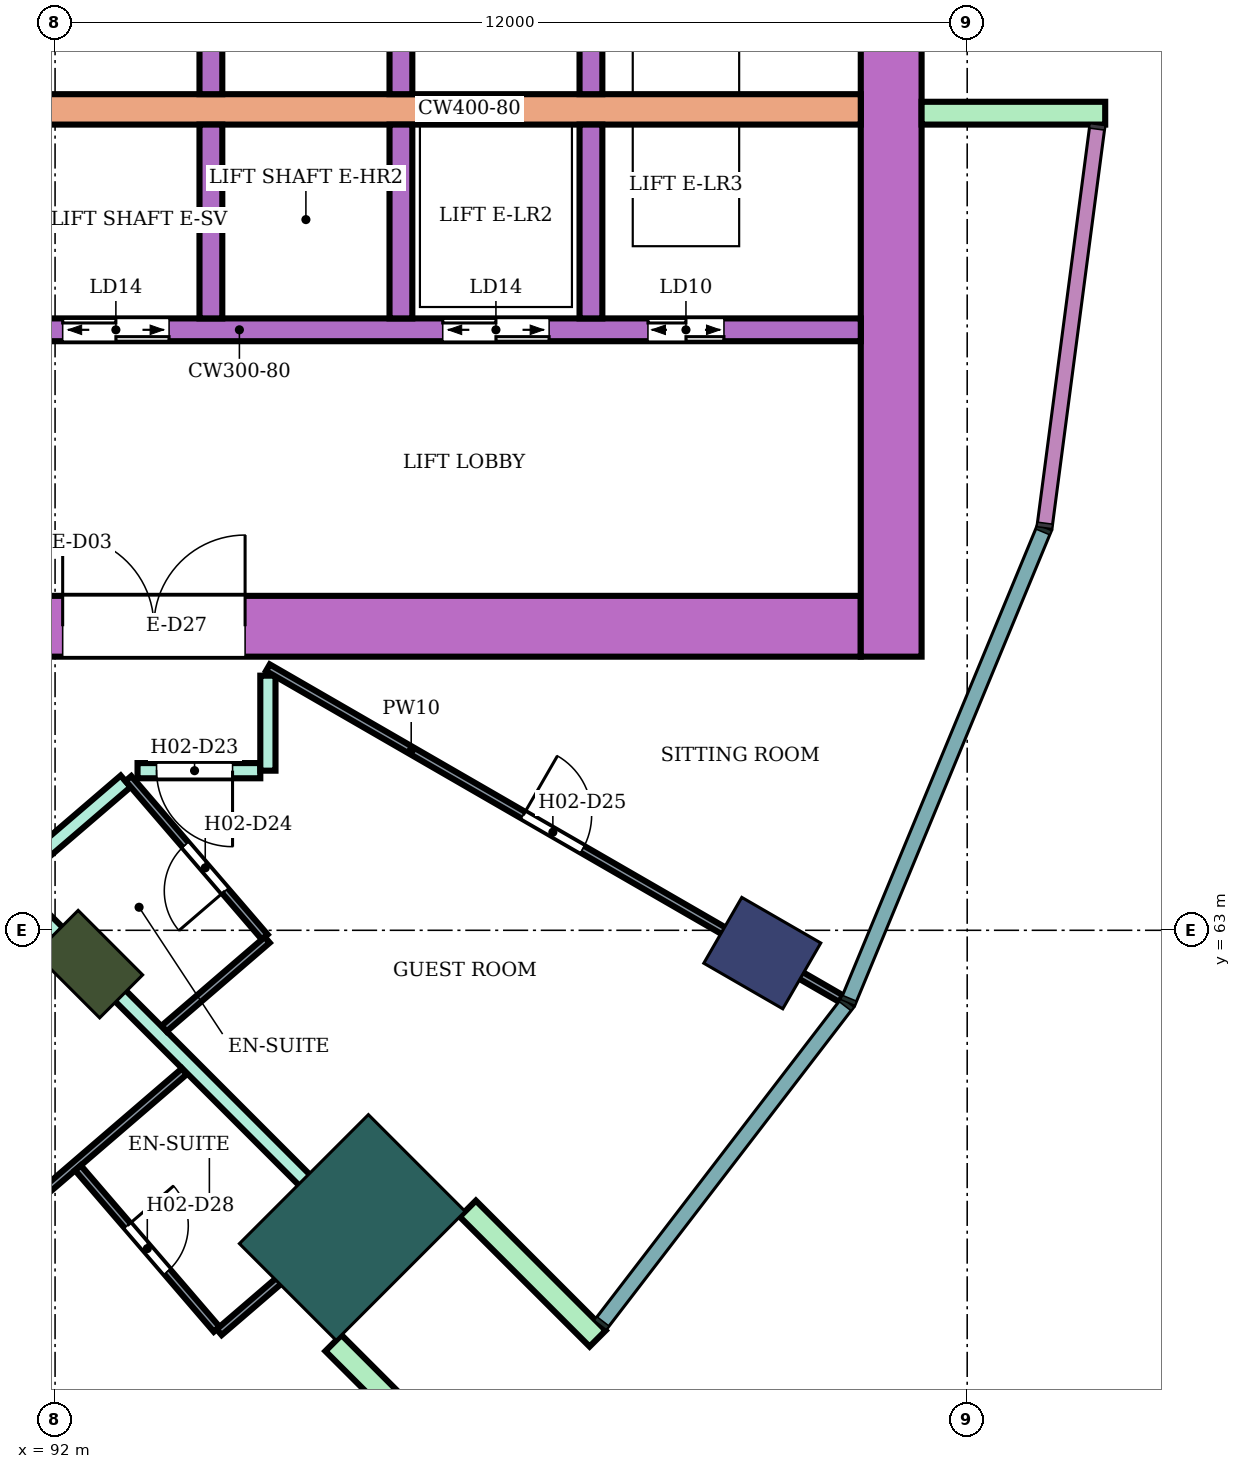
"""IFC4 building model, lengths in metres.
Left out: names, types, materials, properties, quantities, classifications, styles, units other than length and angle.
Written with IfcOpenShell. Run it as: python <this file> out.ifc"""

import sys

from ifc_helpers import new_model, si_unit, direction, frame, frame_2d, origin, origin_2d, place, context, subcontext, project, spatial, rectangle, extrude, element, fill, save


model = new_model("IFC4")
c1 = context("Model", 3, precision=1e-05, world=origin(), true_north=direction((0.0, 1.0)))
c2 = subcontext(c1, "Body", "Model", "MODEL_VIEW")
j1 = project(units=[si_unit("LENGTHUNIT", "METRE"), si_unit("PLANEANGLEUNIT", "RADIAN")], contexts=[c1])
p1 = place(None, origin())
s1 = spatial("IfcSite", under=j1, at=p1, CompositionType="ELEMENT")
p2 = place(p1, origin())
s2 = spatial("IfcBuilding", under=s1, at=p2, CompositionType="ELEMENT")
p3 = place(p2, frame((0.0, 0.0, 44.0)))
s3 = spatial("IfcBuildingStorey", under=s2, at=p3, CompositionType="ELEMENT", Elevation=44.0)
p4 = place(p3, frame((101.304, 62.7, 0.0), z_axis=(0.0, 0.0, 1.0), x_axis=(0.866025403784, -0.5, 0.0)))
e1 = element("IfcColumn", 1, at=p4, inside=s3, PredefinedType="COLUMN", context=c2, shape_type="SweptSolid", body=[
    extrude(rectangle(XDim=1.2, YDim=1.0, at=origin_2d()), origin(), (0.0, 0.0, 1.0), 3.8),
])
p5 = place(p3, frame((92.445, 62.555, 0.0), z_axis=(0.0, 0.0, 1.0), x_axis=(0.707106781187, -0.707106781187, 0.0)))
e2 = element("IfcColumn", 2, at=p5, inside=s3, PredefinedType="COLUMN", context=c2, shape_type="SweptSolid", body=[
    extrude(rectangle(XDim=1.2, YDim=0.8, at=origin_2d()), origin(), (0.0, 0.0, 1.0), 3.8),
])
p6 = place(p3, frame((95.91, 59.09, 0.0), z_axis=(0.0, 0.0, 1.0), x_axis=(0.707106781187, -0.707106781187, 0.0)))
e3 = element("IfcColumn", 3, at=p6, inside=s3, PredefinedType="COLUMN", context=c2, shape_type="SweptSolid", body=[
    extrude(rectangle(XDim=1.8, YDim=2.4, at=origin_2d()), origin(), (0.0, 0.0, 1.0), 3.8),
])
p7 = place(p3, frame((87.9, 67.0, 0.0), z_axis=(0.0, 0.0, 1.0), x_axis=(1.0, 0.0, 0.0)))
e4 = element("IfcWall", 4, at=p7, inside=s3, PredefinedType="SHEAR", context=c2, shape_type="SweptSolid", body=[
    extrude(rectangle(XDim=14.7, YDim=0.8, at=frame_2d((7.35, 0.0))), origin(), (0.0, 0.0, 1.0), 3.48),
])
p8 = place(p7, frame((4.2, 0.0, 0.0)))
e5 = element("IfcOpeningElement", 5, at=p8, cuts=e4, PredefinedType="OPENING", context=c2, shape_type="SweptSolid", body=[
    extrude(rectangle(XDim=2.4, YDim=2.4, at=frame_2d((1.2, 1.2))), frame((0.0, 0.41, 0.0), z_axis=(0.0, -1.0, 0.0), x_axis=(1.0, 0.0, 0.0)), (0.0, 0.0, 1.0), 0.82),
])
p9 = place(p3, frame((103.0, 66.6, 0.0), z_axis=(0.0, 0.0, 1.0), x_axis=(0.0, 1.0, 0.0)))
e6 = element("IfcWall", 6, at=p9, inside=s3, PredefinedType="SHEAR", context=c2, shape_type="SweptSolid", body=[
    extrude(rectangle(XDim=16.8, YDim=0.8, at=frame_2d((8.4, 0.0))), origin(), (0.0, 0.0, 1.0), 3.48),
])
p10 = place(p3, frame((91.7, 73.8, 0.0), z_axis=(0.0, 0.0, 1.0), x_axis=(1.0, 0.0, 0.0)))
e7 = element("IfcWall", 7, at=p10, inside=s3, PredefinedType="SHEAR", context=c2, shape_type="SweptSolid", body=[
    extrude(rectangle(XDim=10.9, YDim=0.4, at=frame_2d((5.45, 0.0))), origin(), (0.0, 0.0, 1.0), 3.48),
])
p11 = place(p3, frame((91.7, 70.9, 0.0), z_axis=(0.0, 0.0, 1.0), x_axis=(1.0, 0.0, 0.0)))
e8 = element("IfcWall", 8, at=p11, inside=s3, PredefinedType="SHEAR", context=c2, shape_type="SweptSolid", body=[
    extrude(rectangle(XDim=10.9, YDim=0.3, at=frame_2d((5.45, 0.0))), origin(), (0.0, 0.0, 1.0), 3.48),
])
p12 = place(p11, frame((0.4, 0.0, 0.0)))
e9 = element("IfcOpeningElement", 9, at=p12, cuts=e8, PredefinedType="OPENING", context=c2, shape_type="SweptSolid", body=[
    extrude(rectangle(XDim=1.4, YDim=2.1, at=frame_2d((0.7, 1.05))), frame((0.0, 0.16, 0.0), z_axis=(0.0, -1.0, 0.0), x_axis=(1.0, 0.0, 0.0)), (0.0, 0.0, 1.0), 0.32),
])
p13 = place(p11, frame((5.4, 0.0, 0.0)))
e10 = element("IfcOpeningElement", 10, at=p13, cuts=e8, PredefinedType="OPENING", context=c2, shape_type="SweptSolid", body=[
    extrude(rectangle(XDim=1.4, YDim=2.1, at=frame_2d((0.7, 1.05))), frame((0.0, 0.16, 0.0), z_axis=(0.0, -1.0, 0.0), x_axis=(1.0, 0.0, 0.0)), (0.0, 0.0, 1.0), 0.32),
])
p14 = place(p11, frame((8.1, 0.0, 0.0)))
e11 = element("IfcOpeningElement", 11, at=p14, cuts=e8, PredefinedType="OPENING", context=c2, shape_type="SweptSolid", body=[
    extrude(rectangle(XDim=1.0, YDim=2.1, at=frame_2d((0.5, 1.05))), frame((0.0, 0.16, 0.0), z_axis=(0.0, -1.0, 0.0), x_axis=(1.0, 0.0, 0.0)), (0.0, 0.0, 1.0), 0.32),
])
for number, where, z_axis, x_axis in (
    (12, (94.05, 74.0, 0.0), (0.0, 0.0, 1.0), (0.0, 1.0, 0.0)),
    (13, (96.55, 74.0, 0.0), (0.0, 0.0, 1.0), (0.0, 1.0, 0.0)),
    (14, (99.05, 74.0, 0.0), (0.0, 0.0, 1.0), (0.0, 1.0, 0.0)),
    (15, (94.05, 71.05, 0.0), (0.0, 0.0, 1.0), (0.0, 1.0, 0.0)),
    (16, (96.55, 71.05, 0.0), (0.0, 0.0, 1.0), (0.0, 1.0, 0.0)),
    (17, (99.05, 71.05, 0.0), (0.0, 0.0, 1.0), (0.0, 1.0, 0.0)),
):
    element("IfcWall", number, at=place(p3, frame(where, z_axis=z_axis, x_axis=x_axis)), inside=s3, PredefinedType="SHEAR", context=c2, shape_type="SweptSolid", body=[
        extrude(rectangle(XDim=2.55, YDim=0.3, at=frame_2d((1.275, 0.0))), origin(), (0.0, 0.0, 1.0), 3.48),
    ])
for number, where, z_axis, x_axis in (
    (18, (103.4, 73.75, 0.0), (0.0, 0.0, 1.0), (1.0, 0.0, 0.0)),
    (19, (95.662, 57.57, 0.0), (0.0, 0.0, 1.0), (0.707, -0.707, 0.0)),
    (20, (97.43, 59.338, 0.0), (0.0, 0.0, 1.0), (0.707, -0.707, 0.0)),
):
    element("IfcWall", number, at=place(p3, frame(where, z_axis=z_axis, x_axis=x_axis)), inside=s3, PredefinedType="NOTDEFINED", context=c2, shape_type="SweptSolid", body=[
        extrude(rectangle(XDim=2.416, YDim=0.3, at=frame_2d((1.208, 0.0))), origin(), (0.0, 0.0, 1.0), 3.8),
    ])
p15 = place(p3, frame((88.235, 60.931, 0.0), z_axis=(0.0, 0.0, 1.0), x_axis=(0.758799498714, 0.651324282329, 0.0)))
e21 = element("IfcWall", 21, at=p15, inside=s3, PredefinedType="PARTITIONING", context=c2, shape_type="SweptSolid", body=[
    extrude(rectangle(XDim=6.186, YDim=0.2, at=frame_2d((3.093, 0.0))), origin(), (0.0, 0.0, 1.0), 3.35),
])
p16 = place(p15, frame((1.519, 0.0, 0.0)))
e22 = element("IfcOpeningElement", 22, at=p16, cuts=e21, PredefinedType="OPENING", context=c2, shape_type="SweptSolid", body=[
    extrude(rectangle(XDim=1.0, YDim=2.1, at=frame_2d((0.5, 1.05))), frame((0.0, 0.11, 0.0), z_axis=(0.0, -1.0, 0.0), x_axis=(1.0, 0.0, 0.0)), (0.0, 0.0, 1.0), 0.22),
])
p17 = place(p3, frame((88.159, 60.863, 0.0), z_axis=(0.0, 0.0, 1.0), x_axis=(0.499897184548, -0.866084756177, 0.0)))
e23 = element("IfcWall", 23, at=p17, inside=s3, PredefinedType="PARTITIONING", context=c2, shape_type="SweptSolid", body=[
    extrude(rectangle(XDim=9.475, YDim=0.2, at=frame_2d((4.737, 0.0))), origin(), (0.0, 0.0, 1.0), 3.35),
])
p18 = place(p3, frame((91.449, 63.548, 0.0), z_axis=(0.0, 0.0, 1.0), x_axis=(0.706984810649, -0.707228730688, 0.0)))
e24 = element("IfcWall", 24, at=p18, inside=s3, PredefinedType="PARTITIONING", context=c2, shape_type="SweptSolid", body=[
    extrude(rectangle(XDim=7.006, YDim=0.2, at=frame_2d((3.503, 0.0))), origin(), (0.0, 0.0, 1.0), 3.35),
])
p19 = place(p3, frame((93.085, 65.1, 0.0), z_axis=(0.0, 0.0, 1.0), x_axis=(1.0, 0.0, 0.0)))
e25 = element("IfcWall", 25, at=p19, inside=s3, PredefinedType="PARTITIONING", context=c2, shape_type="SweptSolid", body=[
    extrude(rectangle(XDim=1.615, YDim=0.2, at=frame_2d((0.808, 0.0))), origin(), (0.0, 0.0, 1.0), 3.35),
])
p20 = place(p19, frame((0.25, 0.0, 0.0)))
e26 = element("IfcOpeningElement", 26, at=p20, cuts=e25, PredefinedType="OPENING", context=c2, shape_type="SweptSolid", body=[
    extrude(rectangle(XDim=1.0, YDim=2.1, at=frame_2d((0.5, 1.05))), frame((0.0, 0.11, 0.0), z_axis=(0.0, -1.0, 0.0), x_axis=(1.0, 0.0, 0.0)), (0.0, 0.0, 1.0), 0.22),
])
p21 = place(p3, frame((94.8, 65.1, 0.0), z_axis=(0.0, 0.0, 1.0), x_axis=(0.0, 1.0, 0.0)))
e27 = element("IfcWall", 27, at=p21, inside=s3, PredefinedType="PARTITIONING", context=c2, shape_type="SweptSolid", body=[
    extrude(rectangle(XDim=1.25, YDim=0.2, at=frame_2d((0.625, 0.0))), origin(), (0.0, 0.0, 1.0), 3.35),
])
p22 = place(p3, frame((89.974, 57.94, 0.0), z_axis=(0.0, 0.0, 1.0), x_axis=(0.75821417454, 0.652005571699, 0.0)))
e28 = element("IfcWall", 28, at=p22, inside=s3, PredefinedType="PARTITIONING", context=c2, shape_type="SweptSolid", body=[
    extrude(rectangle(XDim=4.915, YDim=0.1, at=frame_2d((2.457, 0.0))), origin(), (0.0, 0.0, 1.0), 3.35),
])
p23 = place(p22, frame((1.017, 0.0, 0.0)))
e29 = element("IfcOpeningElement", 29, at=p23, cuts=e28, PredefinedType="OPENING", context=c2, shape_type="SweptSolid", body=[
    extrude(rectangle(XDim=0.9, YDim=2.1, at=frame_2d((0.45, 1.05))), frame((0.0, 0.06, 0.0), z_axis=(0.0, -1.0, 0.0), x_axis=(1.0, 0.0, 0.0)), (0.0, 0.0, 1.0), 0.12),
])
p24 = place(p3, frame((92.301, 59.874, 0.0), z_axis=(0.0, 0.0, 1.0), x_axis=(0.652061320562, -0.758166231262, 0.0)))
e30 = element("IfcWall", 30, at=p24, inside=s3, PredefinedType="PARTITIONING", context=c2, shape_type="SweptSolid", body=[
    extrude(rectangle(XDim=2.8, YDim=0.1, at=frame_2d((1.4, 0.0))), origin(), (0.0, 0.0, 1.0), 3.35),
])
p25 = place(p24, frame((1.0, 0.0, 0.0)))
e31 = element("IfcOpeningElement", 31, at=p25, cuts=e30, PredefinedType="OPENING", context=c2, shape_type="SweptSolid", body=[
    extrude(rectangle(XDim=0.8, YDim=2.1, at=frame_2d((0.4, 1.05))), frame((0.0, 0.06, 0.0), z_axis=(0.0, -1.0, 0.0), x_axis=(1.0, 0.0, 0.0)), (0.0, 0.0, 1.0), 0.12),
])
p26 = place(p3, frame((92.965, 64.997, 0.0), z_axis=(0.0, 0.0, 1.0), x_axis=(0.652069888227, -0.758158862553, 0.0)))
e32 = element("IfcWall", 32, at=p26, inside=s3, PredefinedType="PARTITIONING", context=c2, shape_type="SweptSolid", body=[
    extrude(rectangle(XDim=2.75, YDim=0.1, at=frame_2d((1.375, 0.0))), origin(), (0.0, 0.0, 1.0), 3.35),
])
p27 = place(p26, frame((1.15, 0.0, 0.0)))
e33 = element("IfcOpeningElement", 33, at=p27, cuts=e32, PredefinedType="OPENING", context=c2, shape_type="SweptSolid", body=[
    extrude(rectangle(XDim=0.8, YDim=2.1, at=frame_2d((0.4, 1.05))), frame((0.0, 0.06, 0.0), z_axis=(0.0, -1.0, 0.0), x_axis=(1.0, 0.0, 0.0)), (0.0, 0.0, 1.0), 0.12),
])
p28 = place(p3, frame((93.435, 61.707, 0.0), z_axis=(0.0, 0.0, 1.0), x_axis=(0.758070495124, 0.652172618578, 0.0)))
e34 = element("IfcWall", 34, at=p28, inside=s3, PredefinedType="PARTITIONING", context=c2, shape_type="SweptSolid", body=[
    extrude(rectangle(XDim=1.789, YDim=0.1, at=frame_2d((0.895, 0.0))), origin(), (0.0, 0.0, 1.0), 3.35),
])
p29 = place(p3, frame((94.159, 57.713, 0.0), z_axis=(0.0, 0.0, 1.0), x_axis=(0.75802950812, 0.652220257903, 0.0)))
e35 = element("IfcWall", 35, at=p29, inside=s3, PredefinedType="PARTITIONING", context=c2, shape_type="SweptSolid", body=[
    extrude(rectangle(XDim=2.109, YDim=0.1, at=frame_2d((1.054, 0.0))), origin(), (0.0, 0.0, 1.0), 3.35),
])
p30 = place(p3, frame((94.8, 66.455, 0.0), z_axis=(0.0, 0.0, 1.0), x_axis=(0.86602264145, -0.500004784474, 0.0)))
e36 = element("IfcWall", 36, at=p30, inside=s3, PredefinedType="PARTITIONING", context=c2, shape_type="SweptSolid", body=[
    extrude(rectangle(XDim=8.708, YDim=0.1, at=frame_2d((4.354, 0.0))), origin(), (0.0, 0.0, 1.0), 3.35),
])
p31 = place(p30, frame((3.879, 0.0, 0.0)))
e37 = element("IfcOpeningElement", 37, at=p31, cuts=e36, PredefinedType="OPENING", context=c2, shape_type="SweptSolid", body=[
    extrude(rectangle(XDim=0.9, YDim=2.1, at=frame_2d((0.45, 1.05))), frame((0.0, 0.06, 0.0), z_axis=(0.0, -1.0, 0.0), x_axis=(1.0, 0.0, 0.0)), (0.0, 0.0, 1.0), 0.12),
])
p32 = place(p20, frame((1.0, 0.0, 0.0), z_axis=(0.0, 0.0, 1.0), x_axis=(-1.0, 0.0, 0.0)))
e38 = element("IfcDoor", 38, at=p32, inside=s3, OperationType="SINGLE_SWING_LEFT", PredefinedType="DOOR", context=c2, shape_type="SweptSolid", body=[
    extrude(rectangle(XDim=1.0, YDim=2.1, at=frame_2d((0.5, 1.05))), frame((0.0, 0.025, 0.0), z_axis=(0.0, -1.0, 0.0), x_axis=(1.0, 0.0, 0.0)), (0.0, 0.0, 1.0), 0.05),
])
fill(e26, e38)
p33 = place(p27, frame((0.8, 0.0, 0.0), z_axis=(0.0, 0.0, 1.0), x_axis=(-1.0, 0.0, 0.0)))
e39 = element("IfcDoor", 39, at=p33, inside=s3, OperationType="SINGLE_SWING_LEFT", PredefinedType="DOOR", context=c2, shape_type="SweptSolid", body=[
    extrude(rectangle(XDim=0.8, YDim=2.1, at=frame_2d((0.4, 1.05))), frame((0.0, 0.025, 0.0), z_axis=(0.0, -1.0, 0.0), x_axis=(1.0, 0.0, 0.0)), (0.0, 0.0, 1.0), 0.05),
])
fill(e33, e39)
p34 = place(p31, origin())
e40 = element("IfcDoor", 40, at=p34, inside=s3, OperationType="SINGLE_SWING_LEFT", PredefinedType="DOOR", context=c2, shape_type="SweptSolid", body=[
    extrude(rectangle(XDim=0.9, YDim=2.1, at=frame_2d((0.45, 1.05))), frame((0.0, 0.025, 0.0), z_axis=(0.0, -1.0, 0.0), x_axis=(1.0, 0.0, 0.0)), (0.0, 0.0, 1.0), 0.05),
])
fill(e37, e40)
p35 = place(p25, origin())
e41 = element("IfcDoor", 41, at=p35, inside=s3, OperationType="SINGLE_SWING_LEFT", PredefinedType="DOOR", context=c2, shape_type="SweptSolid", body=[
    extrude(rectangle(XDim=0.8, YDim=2.1, at=frame_2d((0.4, 1.05))), frame((0.0, 0.025, 0.0), z_axis=(0.0, -1.0, 0.0), x_axis=(1.0, 0.0, 0.0)), (0.0, 0.0, 1.0), 0.05),
])
fill(e31, e41)
p36 = place(p12, origin())
e42 = element("IfcDoor", 42, at=p36, inside=s3, OperationType="DOUBLE_DOOR_SLIDING", PredefinedType="DOOR", context=c2, shape_type="SweptSolid", body=[
    extrude(rectangle(XDim=1.4, YDim=2.1, at=frame_2d((0.7, 1.05))), frame((0.0, 0.025, 0.0), z_axis=(0.0, -1.0, 0.0), x_axis=(1.0, 0.0, 0.0)), (0.0, 0.0, 1.0), 0.05),
])
fill(e9, e42)
p37 = place(p13, origin())
e43 = element("IfcDoor", 43, at=p37, inside=s3, OperationType="DOUBLE_DOOR_SLIDING", PredefinedType="DOOR", context=c2, shape_type="SweptSolid", body=[
    extrude(rectangle(XDim=1.4, YDim=2.1, at=frame_2d((0.7, 1.05))), frame((0.0, 0.025, 0.0), z_axis=(0.0, -1.0, 0.0), x_axis=(1.0, 0.0, 0.0)), (0.0, 0.0, 1.0), 0.05),
])
fill(e10, e43)
p38 = place(p14, origin())
e44 = element("IfcDoor", 44, at=p38, inside=s3, OperationType="DOUBLE_DOOR_SLIDING", PredefinedType="DOOR", context=c2, shape_type="SweptSolid", body=[
    extrude(rectangle(XDim=1.0, YDim=2.1, at=frame_2d((0.5, 1.05))), frame((0.0, 0.025, 0.0), z_axis=(0.0, -1.0, 0.0), x_axis=(1.0, 0.0, 0.0)), (0.0, 0.0, 1.0), 0.05),
])
fill(e11, e44)
p39 = place(p8, origin())
e45 = element("IfcDoor", 45, at=p39, inside=s3, OperationType="DOUBLE_DOOR_SINGLE_SWING", PredefinedType="DOOR", context=c2, shape_type="SweptSolid", body=[
    extrude(rectangle(XDim=2.4, YDim=2.4, at=frame_2d((1.2, 1.2))), frame((0.0, 0.025, 0.0), z_axis=(0.0, -1.0, 0.0), x_axis=(1.0, 0.0, 0.0)), (0.0, 0.0, 1.0), 0.05),
])
fill(e5, e45)
save(model, sys.argv[1])
